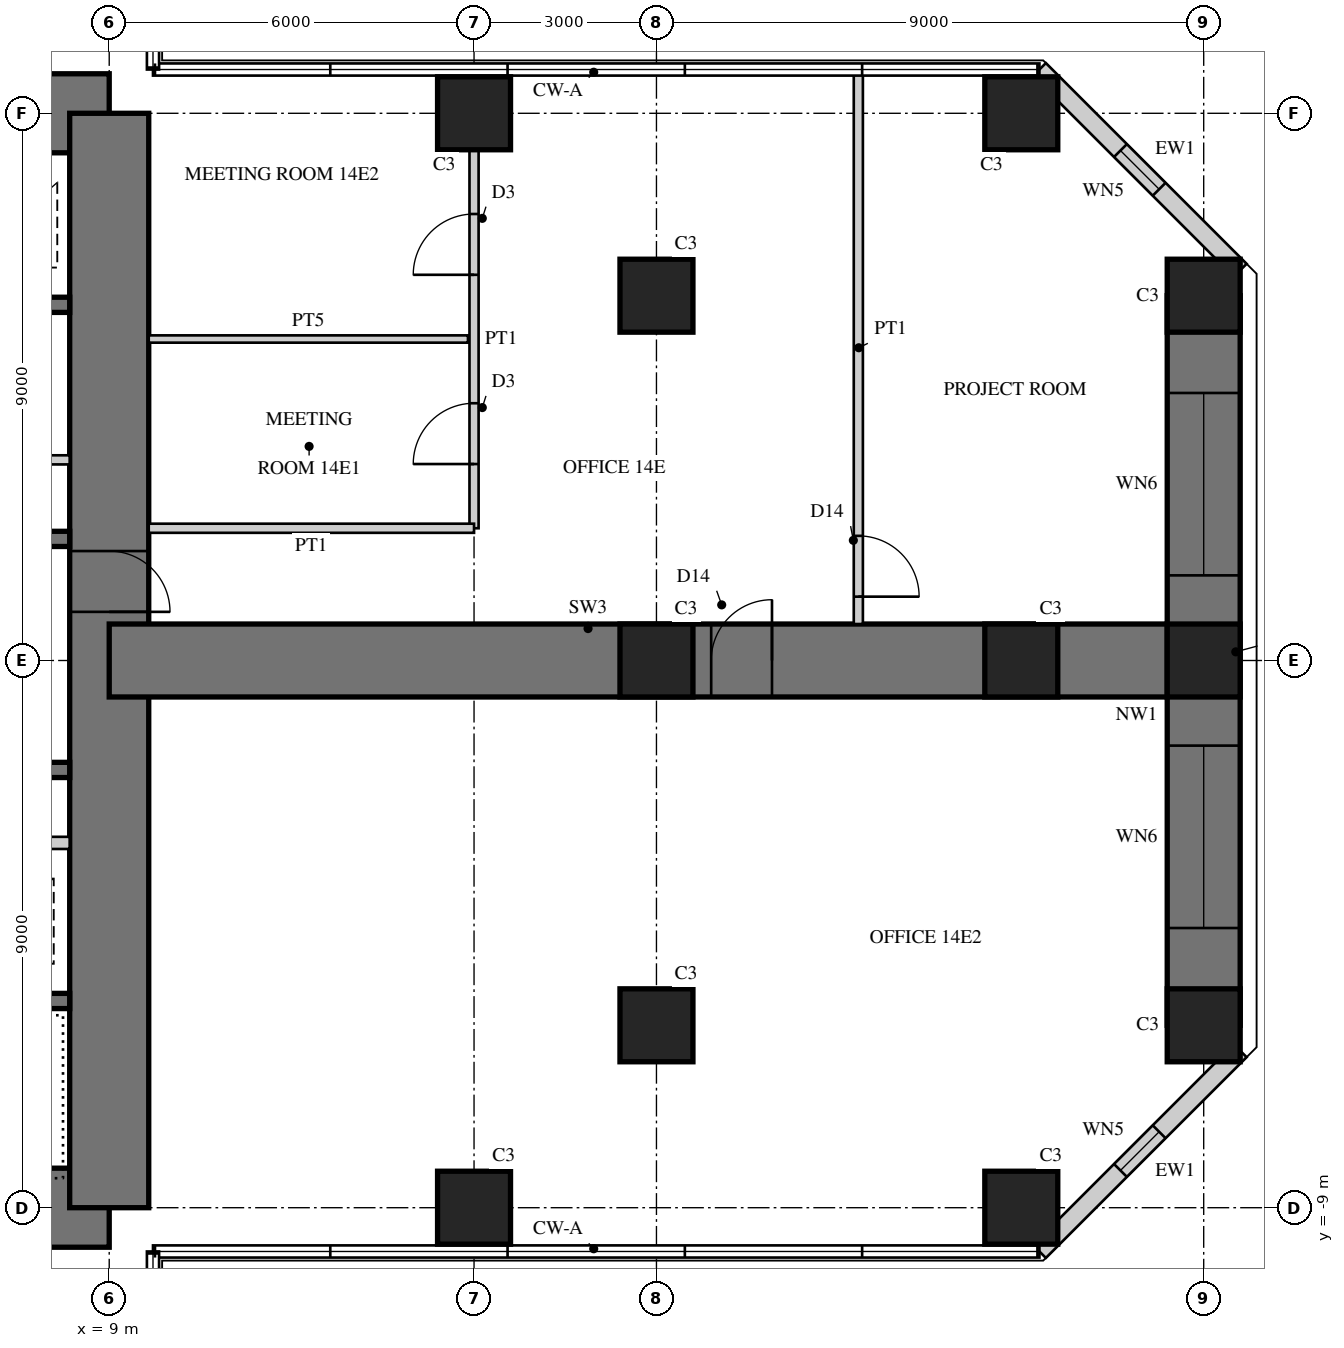
"""IFC4 building model, lengths in metres.
Left out: names, types, materials, properties, quantities, classifications, styles, units other than length and angle.
Written with IfcOpenShell. Run it as: python <this file> out.ifc"""

import sys

from ifc_helpers import new_model, si_unit, direction, frame, frame_2d, origin, origin_2d, place, context, subcontext, project, spatial, rectangle, hollow_rectangle, extrude, element, fill, save


model = new_model("IFC4")
c1 = context("Model", 3, precision=1e-05, world=origin(), true_north=direction((0.0, 1.0)))
c2 = subcontext(c1, "Body", "Model", "MODEL_VIEW")
j1 = project(units=[si_unit("LENGTHUNIT", "METRE"), si_unit("PLANEANGLEUNIT", "RADIAN")], contexts=[c1])
p1 = place(None, origin())
s1 = spatial("IfcSite", under=j1, at=p1, CompositionType="ELEMENT")
p2 = place(p1, origin())
s2 = spatial("IfcBuilding", under=s1, at=p2, CompositionType="ELEMENT")
p3 = place(p2, frame((0.0, 0.0, 59.5)))
s3 = spatial("IfcBuildingStorey", under=s2, at=p3, CompositionType="ELEMENT", Elevation=59.5)
p4 = place(p3, frame((9.0, 9.0, 0.0), z_axis=(0.0, 0.0, 1.0), x_axis=(-1.0, 0.0, 0.0)))
e1 = element("IfcWall", 1, at=p4, inside=s3, PredefinedType="SHEAR", context=c2, shape_type="SweptSolid", body=[
    extrude(rectangle(XDim=18.0, YDim=1.3, at=frame_2d((9.0, 0.0))), origin(), (0.0, 0.0, 1.0), 4.0),
])
p5 = place(p4, frame((9.8, 0.0, 0.0)))
e2 = element("IfcOpeningElement", 2, at=p5, cuts=e1, PredefinedType="OPENING", context=c2, shape_type="SweptSolid", body=[
    extrude(rectangle(XDim=1.0, YDim=2.4, at=frame_2d((0.5, 1.2))), frame((0.0, 0.66, 0.0), z_axis=(0.0, -1.0, 0.0), x_axis=(1.0, 0.0, 0.0)), (0.0, 0.0, 1.0), 1.32),
])
p6 = place(p3, frame((-9.0, -9.0, 0.0), z_axis=(0.0, 0.0, 1.0), x_axis=(1.0, 0.0, 0.0)))
e3 = element("IfcWall", 3, at=p6, inside=s3, PredefinedType="SHEAR", context=c2, shape_type="SweptSolid", body=[
    extrude(rectangle(XDim=18.0, YDim=1.3, at=frame_2d((9.0, 0.0))), origin(), (0.0, 0.0, 1.0), 4.0),
])
p7 = place(p6, frame((9.8, 0.0, 0.0)))
e4 = element("IfcOpeningElement", 4, at=p7, cuts=e3, PredefinedType="OPENING", context=c2, shape_type="SweptSolid", body=[
    extrude(rectangle(XDim=1.0, YDim=2.4, at=frame_2d((0.5, 1.2))), frame((0.0, 0.66, 0.0), z_axis=(0.0, -1.0, 0.0), x_axis=(1.0, 0.0, 0.0)), (0.0, 0.0, 1.0), 1.32),
])
p8 = place(p3, frame((9.0, -9.0, 0.0), z_axis=(0.0, 0.0, 1.0), x_axis=(0.0, 1.0, 0.0)))
e5 = element("IfcWall", 5, at=p8, inside=s3, PredefinedType="SHEAR", context=c2, shape_type="SweptSolid", body=[
    extrude(rectangle(XDim=18.0, YDim=1.3, at=frame_2d((9.0, 0.0))), origin(), (0.0, 0.0, 1.0), 4.0),
])
p9 = place(p8, frame((9.8, 0.0, 0.0)))
e6 = element("IfcOpeningElement", 6, at=p9, cuts=e5, PredefinedType="OPENING", context=c2, shape_type="SweptSolid", body=[
    extrude(rectangle(XDim=1.0, YDim=2.4, at=frame_2d((0.5, 1.2))), frame((0.0, 0.66, 0.0), z_axis=(0.0, -1.0, 0.0), x_axis=(1.0, 0.0, 0.0)), (0.0, 0.0, 1.0), 1.32),
])
p10 = place(p3, frame((1.925, 2.0, 0.0), z_axis=(0.0, 0.0, 1.0), x_axis=(1.0, 0.0, 0.0)))
e7 = element("IfcWall", 7, at=p10, inside=s3, PredefinedType="SHEAR", context=c2, shape_type="SweptSolid", body=[
    extrude(rectangle(XDim=6.425, YDim=0.25, at=frame_2d((3.212, 0.0))), origin(), (0.0, 0.0, 1.0), 4.0),
])
p11 = place(p3, frame((1.925, 5.85, 0.0), z_axis=(0.0, 0.0, 1.0), x_axis=(1.0, 0.0, 0.0)))
e8 = element("IfcWall", 8, at=p11, inside=s3, PredefinedType="SHEAR", context=c2, shape_type="SweptSolid", body=[
    extrude(rectangle(XDim=6.425, YDim=0.25, at=frame_2d((3.212, 0.0))), origin(), (0.0, 0.0, 1.0), 4.0),
])
p12 = place(p11, frame((0.454, 0.0, 0.0)))
e9 = element("IfcOpeningElement", 9, at=p12, cuts=e8, PredefinedType="OPENING", context=c2, shape_type="SweptSolid", body=[
    extrude(rectangle(XDim=1.1, YDim=2.2, at=frame_2d((0.55, 1.1))), frame((0.0, 0.135, 0.0), z_axis=(0.0, -1.0, 0.0), x_axis=(1.0, 0.0, 0.0)), (0.0, 0.0, 1.0), 0.27),
])
p13 = place(p11, frame((2.663, 0.0, 0.0)))
e10 = element("IfcOpeningElement", 10, at=p13, cuts=e8, PredefinedType="OPENING", context=c2, shape_type="SweptSolid", body=[
    extrude(rectangle(XDim=1.1, YDim=2.2, at=frame_2d((0.55, 1.1))), frame((0.0, 0.135, 0.0), z_axis=(0.0, -1.0, 0.0), x_axis=(1.0, 0.0, 0.0)), (0.0, 0.0, 1.0), 0.27),
])
p14 = place(p11, frame((4.871, 0.0, 0.0)))
e11 = element("IfcOpeningElement", 11, at=p14, cuts=e8, PredefinedType="OPENING", context=c2, shape_type="SweptSolid", body=[
    extrude(rectangle(XDim=1.1, YDim=2.2, at=frame_2d((0.55, 1.1))), frame((0.0, 0.135, 0.0), z_axis=(0.0, -1.0, 0.0), x_axis=(1.0, 0.0, 0.0)), (0.0, 0.0, 1.0), 0.27),
])
p15 = place(p3, frame((1.925, 3.3, 0.0), z_axis=(0.0, 0.0, 1.0), x_axis=(1.0, 0.0, 0.0)))
e12 = element("IfcWall", 12, at=p15, inside=s3, PredefinedType="PARTITIONING", context=c2, shape_type="SweptSolid", body=[
    extrude(rectangle(XDim=6.425, YDim=0.15, at=frame_2d((3.212, 0.0))), origin(), (0.0, 0.0, 1.0), 4.0),
])
p16 = place(p15, frame((0.075, 0.0, 0.0)))
e13 = element("IfcOpeningElement", 13, at=p16, cuts=e12, PredefinedType="OPENING", context=c2, shape_type="SweptSolid", body=[
    extrude(rectangle(XDim=0.8, YDim=2.1, at=frame_2d((0.4, 1.05))), frame((0.0, 0.085, 0.0), z_axis=(0.0, -1.0, 0.0), x_axis=(1.0, 0.0, 0.0)), (0.0, 0.0, 1.0), 0.17),
])
p17 = place(p15, frame((3.675, 0.0, 0.0)))
e14 = element("IfcOpeningElement", 14, at=p17, cuts=e12, PredefinedType="OPENING", context=c2, shape_type="SweptSolid", body=[
    extrude(rectangle(XDim=0.8, YDim=2.1, at=frame_2d((0.4, 1.05))), frame((0.0, 0.085, 0.0), z_axis=(0.0, -1.0, 0.0), x_axis=(1.0, 0.0, 0.0)), (0.0, 0.0, 1.0), 0.17),
])
p18 = place(p3, frame((2.125, -1.8, 0.0), z_axis=(0.0, 0.0, 1.0), x_axis=(1.0, 0.0, 0.0)))
e15 = element("IfcWall", 15, at=p18, inside=s3, PredefinedType="SHEAR", context=c2, shape_type="SweptSolid", body=[
    extrude(rectangle(XDim=6.225, YDim=0.25, at=frame_2d((3.113, 0.0))), origin(), (0.0, 0.0, 1.0), 4.0),
])
p19 = place(p3, frame((2.125, -5.6, 0.0), z_axis=(0.0, 0.0, 1.0), x_axis=(1.0, 0.0, 0.0)))
e16 = element("IfcWall", 16, at=p19, inside=s3, PredefinedType="SHEAR", context=c2, shape_type="SweptSolid", body=[
    extrude(rectangle(XDim=6.225, YDim=0.25, at=frame_2d((3.113, 0.0))), origin(), (0.0, 0.0, 1.0), 4.0),
])
p20 = place(p19, frame((0.175, 0.0, 0.0)))
e17 = element("IfcOpeningElement", 17, at=p20, cuts=e16, PredefinedType="OPENING", context=c2, shape_type="SweptSolid", body=[
    extrude(rectangle(XDim=1.0, YDim=2.1, at=frame_2d((0.5, 1.05))), frame((0.0, 0.135, 0.0), z_axis=(0.0, -1.0, 0.0), x_axis=(1.0, 0.0, 0.0)), (0.0, 0.0, 1.0), 0.27),
])
p21 = place(p3, frame((5.725, -3.0, 0.0), z_axis=(0.0, 0.0, 1.0), x_axis=(1.0, 0.0, 0.0)))
e18 = element("IfcWall", 18, at=p21, inside=s3, PredefinedType="PARTITIONING", context=c2, shape_type="SweptSolid", body=[
    extrude(rectangle(XDim=2.625, YDim=0.2, at=frame_2d((1.312, 0.0))), origin(), (0.0, 0.0, 1.0), 4.0),
])
p22 = place(p3, frame((9.0, 0.0, 0.0), z_axis=(0.0, 0.0, 1.0), x_axis=(1.0, 0.0, 0.0)))
e19 = element("IfcWall", 19, at=p22, inside=s3, PredefinedType="SHEAR", context=c2, shape_type="SweptSolid", body=[
    extrude(rectangle(XDim=18.0, YDim=1.2, at=frame_2d((9.0, 0.0))), origin(), (0.0, 0.0, 1.0), 4.0),
])
p23 = place(p22, frame((9.9, 0.0, 0.0)))
e20 = element("IfcOpeningElement", 20, at=p23, cuts=e19, PredefinedType="OPENING", context=c2, shape_type="SweptSolid", body=[
    extrude(rectangle(XDim=1.0, YDim=2.2, at=frame_2d((0.5, 1.1))), frame((0.0, 0.61, 0.0), z_axis=(0.0, -1.0, 0.0), x_axis=(1.0, 0.0, 0.0)), (0.0, 0.0, 1.0), 1.22),
])
p24 = place(p3, frame((27.0, -6.0, 0.0), z_axis=(0.0, 0.0, 1.0), x_axis=(0.0, 1.0, 0.0)))
e21 = element("IfcWall", 21, at=p24, inside=s3, PredefinedType="SHEAR", context=c2, shape_type="SweptSolid", body=[
    extrude(rectangle(XDim=12.0, YDim=1.2, at=frame_2d((6.0, 0.0))), origin(), (0.0, 0.0, 1.0), 4.0),
])
p25 = place(p24, frame((1.6, 0.0, 0.6)))
e22 = element("IfcOpeningElement", 22, at=p25, cuts=e21, PredefinedType="OPENING", context=c2, shape_type="SweptSolid", body=[
    extrude(rectangle(XDim=3.0, YDim=2.4, at=frame_2d((1.5, 1.2))), frame((0.0, 0.61, 0.0), z_axis=(0.0, -1.0, 0.0), x_axis=(1.0, 0.0, 0.0)), (0.0, 0.0, 1.0), 1.22),
])
p26 = place(p24, frame((7.4, 0.0, 0.6)))
e23 = element("IfcOpeningElement", 23, at=p26, cuts=e21, PredefinedType="OPENING", context=c2, shape_type="SweptSolid", body=[
    extrude(rectangle(XDim=3.0, YDim=2.4, at=frame_2d((1.5, 1.2))), frame((0.0, 0.61, 0.0), z_axis=(0.0, -1.0, 0.0), x_axis=(1.0, 0.0, 0.0)), (0.0, 0.0, 1.0), 1.22),
])
for number, where, z_axis, x_axis in (
    (24, (15.0, -9.0, 0.0), (0.0, 0.0, 1.0), (1.0, 0.0, 0.0)),
    (25, (24.0, -9.0, 0.0), (0.0, 0.0, 1.0), (1.0, 0.0, 0.0)),
    (26, (15.0, 9.0, 0.0), (0.0, 0.0, 1.0), (1.0, 0.0, 0.0)),
    (27, (24.0, 9.0, 0.0), (0.0, 0.0, 1.0), (1.0, 0.0, 0.0)),
    (28, (27.0, -6.0, 0.0), (0.0, 0.0, 1.0), (1.0, 0.0, 0.0)),
    (29, (27.0, 0.0, 0.0), (0.0, 0.0, 1.0), (1.0, 0.0, 0.0)),
    (30, (27.0, 6.0, 0.0), (0.0, 0.0, 1.0), (1.0, 0.0, 0.0)),
    (31, (18.0, -6.0, 0.0), (0.0, 0.0, 1.0), (1.0, 0.0, 0.0)),
    (32, (18.0, 0.0, 0.0), (0.0, 0.0, 1.0), (1.0, 0.0, 0.0)),
    (33, (18.0, 6.0, 0.0), (0.0, 0.0, 1.0), (1.0, 0.0, 0.0)),
    (34, (24.0, 0.0, 0.0), (0.0, 0.0, 1.0), (1.0, 0.0, 0.0)),
):
    element("IfcColumn", number, at=place(p3, frame(where, z_axis=z_axis, x_axis=x_axis)), inside=s3, PredefinedType="COLUMN", context=c2, shape_type="SweptSolid", body=[
        extrude(rectangle(XDim=1.2, YDim=1.2, at=origin_2d()), origin(), (0.0, 0.0, 1.0), 4.0),
    ])
p27 = place(p3, frame((24.298, -9.72, 0.0), z_axis=(0.0, 0.0, 1.0), x_axis=(0.707106781187, 0.707106781187, 0.0)))
e35 = element("IfcWall", 35, at=p27, inside=s3, PredefinedType="SOLIDWALL", context=c2, shape_type="SweptSolid", body=[
    extrude(rectangle(XDim=4.669, YDim=0.3, at=frame_2d((2.335, 0.0))), origin(), (0.0, 0.0, 1.0), 3.8),
])
p28 = place(p27, frame((1.885, 0.0, 0.3)))
e36 = element("IfcOpeningElement", 36, at=p28, cuts=e35, PredefinedType="OPENING", context=c2, shape_type="SweptSolid", body=[
    extrude(rectangle(XDim=0.9, YDim=2.4, at=frame_2d((0.45, 1.2))), frame((0.0, 0.16, 0.0), z_axis=(0.0, -1.0, 0.0), x_axis=(1.0, 0.0, 0.0)), (0.0, 0.0, 1.0), 0.32),
])
p29 = place(p3, frame((27.6, 6.418, 0.0), z_axis=(0.0, 0.0, 1.0), x_axis=(-0.707106781187, 0.707106781187, 0.0)))
e37 = element("IfcWall", 37, at=p29, inside=s3, PredefinedType="SOLIDWALL", context=c2, shape_type="SweptSolid", body=[
    extrude(rectangle(XDim=4.669, YDim=0.3, at=frame_2d((2.335, 0.0))), origin(), (0.0, 0.0, 1.0), 3.8),
])
p30 = place(p29, frame((1.885, 0.0, 0.3)))
e38 = element("IfcOpeningElement", 38, at=p30, cuts=e37, PredefinedType="OPENING", context=c2, shape_type="SweptSolid", body=[
    extrude(rectangle(XDim=0.9, YDim=2.4, at=frame_2d((0.45, 1.2))), frame((0.0, 0.16, 0.0), z_axis=(0.0, -1.0, 0.0), x_axis=(1.0, 0.0, 0.0)), (0.0, 0.0, 1.0), 0.32),
])
p31 = place(p3, frame((15.0, 2.175, 0.0), z_axis=(0.0, 0.0, 1.0), x_axis=(0.0, 1.0, 0.0)))
e39 = element("IfcWall", 39, at=p31, inside=s3, PredefinedType="PARTITIONING", context=c2, shape_type="SweptSolid", body=[
    extrude(rectangle(XDim=6.225, YDim=0.15, at=frame_2d((3.112, 0.0))), origin(), (0.0, 0.0, 1.0), 2.95),
])
p32 = place(p31, frame((1.056, 0.0, 0.0)))
e40 = element("IfcOpeningElement", 40, at=p32, cuts=e39, PredefinedType="OPENING", context=c2, shape_type="SweptSolid", body=[
    extrude(rectangle(XDim=1.0, YDim=2.1, at=frame_2d((0.5, 1.05))), frame((0.0, 0.085, 0.0), z_axis=(0.0, -1.0, 0.0), x_axis=(1.0, 0.0, 0.0)), (0.0, 0.0, 1.0), 0.17),
])
p33 = place(p31, frame((4.169, 0.0, 0.0)))
e41 = element("IfcOpeningElement", 41, at=p33, cuts=e39, PredefinedType="OPENING", context=c2, shape_type="SweptSolid", body=[
    extrude(rectangle(XDim=1.0, YDim=2.1, at=frame_2d((0.5, 1.05))), frame((0.0, 0.085, 0.0), z_axis=(0.0, -1.0, 0.0), x_axis=(1.0, 0.0, 0.0)), (0.0, 0.0, 1.0), 0.17),
])
p34 = place(p3, frame((9.65, 2.175, 0.0), z_axis=(0.0, 0.0, 1.0), x_axis=(1.0, 0.0, 0.0)))
e42 = element("IfcWall", 42, at=p34, inside=s3, PredefinedType="PARTITIONING", context=c2, shape_type="SweptSolid", body=[
    extrude(rectangle(XDim=5.35, YDim=0.15, at=frame_2d((2.675, 0.0))), origin(), (0.0, 0.0, 1.0), 3.8),
])
p35 = place(p3, frame((9.65, 5.288, 0.0), z_axis=(0.0, 0.0, 1.0), x_axis=(1.0, 0.0, 0.0)))
e43 = element("IfcWall", 43, at=p35, inside=s3, PredefinedType="PLUMBINGWALL", context=c2, shape_type="SweptSolid", body=[
    extrude(rectangle(XDim=5.25, YDim=0.12, at=frame_2d((2.625, 0.0))), origin(), (0.0, 0.0, 1.0), 3.8),
])
p36 = place(p3, frame((21.32, 0.6, 0.0), z_axis=(0.0, 0.0, 1.0), x_axis=(0.0, 1.0, 0.0)))
e44 = element("IfcWall", 44, at=p36, inside=s3, PredefinedType="PARTITIONING", context=c2, shape_type="SweptSolid", body=[
    extrude(rectangle(XDim=9.08, YDim=0.15, at=frame_2d((4.54, 0.0))), origin(), (0.0, 0.0, 1.0), 3.8),
])
p37 = place(p36, frame((0.45, 0.0, 0.0)))
e45 = element("IfcOpeningElement", 45, at=p37, cuts=e44, PredefinedType="OPENING", context=c2, shape_type="SweptSolid", body=[
    extrude(rectangle(XDim=1.0, YDim=2.2, at=frame_2d((0.5, 1.1))), frame((0.0, 0.085, 0.0), z_axis=(0.0, -1.0, 0.0), x_axis=(1.0, 0.0, 0.0)), (0.0, 0.0, 1.0), 0.17),
])
p38 = place(p28, origin())
e46 = element("IfcWindow", 46, at=p38, inside=s3, PartitioningType="SINGLE_PANEL", PredefinedType="WINDOW", context=c2, shape_type="SweptSolid", body=[
    extrude(hollow_rectangle(XDim=0.9, YDim=2.4, WallThickness=0.06, at=frame_2d((0.45, 1.2))), frame((0.0, 0.03, 0.0), z_axis=(0.0, -1.0, 0.0), x_axis=(1.0, 0.0, 0.0)), (0.0, 0.0, 1.0), 0.06),
    extrude(rectangle(XDim=0.779, YDim=2.279, at=frame_2d((0.45, 1.2))), frame((0.0, 0.03, 0.0), z_axis=(0.0, -1.0, 0.0), x_axis=(1.0, 0.0, 0.0)), (0.0, 0.0, 1.0), 0.06),
])
fill(e36, e46)
p39 = place(p25, origin())
e47 = element("IfcWindow", 47, at=p39, inside=s3, PartitioningType="SINGLE_PANEL", PredefinedType="WINDOW", context=c2, shape_type="SweptSolid", body=[
    extrude(hollow_rectangle(XDim=3.0, YDim=2.4, WallThickness=0.06, at=frame_2d((1.5, 1.2))), frame((0.0, 0.03, 0.0), z_axis=(0.0, -1.0, 0.0), x_axis=(1.0, 0.0, 0.0)), (0.0, 0.0, 1.0), 0.06),
    extrude(rectangle(XDim=2.879, YDim=2.279, at=frame_2d((1.5, 1.2))), frame((0.0, 0.03, 0.0), z_axis=(0.0, -1.0, 0.0), x_axis=(1.0, 0.0, 0.0)), (0.0, 0.0, 1.0), 0.06),
])
fill(e22, e47)
p40 = place(p26, origin())
e48 = element("IfcWindow", 48, at=p40, inside=s3, PartitioningType="SINGLE_PANEL", PredefinedType="WINDOW", context=c2, shape_type="SweptSolid", body=[
    extrude(hollow_rectangle(XDim=3.0, YDim=2.4, WallThickness=0.06, at=frame_2d((1.5, 1.2))), frame((0.0, 0.03, 0.0), z_axis=(0.0, -1.0, 0.0), x_axis=(1.0, 0.0, 0.0)), (0.0, 0.0, 1.0), 0.06),
    extrude(rectangle(XDim=2.879, YDim=2.279, at=frame_2d((1.5, 1.2))), frame((0.0, 0.03, 0.0), z_axis=(0.0, -1.0, 0.0), x_axis=(1.0, 0.0, 0.0)), (0.0, 0.0, 1.0), 0.06),
])
fill(e23, e48)
p41 = place(p30, origin())
e49 = element("IfcWindow", 49, at=p41, inside=s3, PartitioningType="SINGLE_PANEL", PredefinedType="WINDOW", context=c2, shape_type="SweptSolid", body=[
    extrude(hollow_rectangle(XDim=0.9, YDim=2.4, WallThickness=0.06, at=frame_2d((0.45, 1.2))), frame((0.0, 0.03, 0.0), z_axis=(0.0, -1.0, 0.0), x_axis=(1.0, 0.0, 0.0)), (0.0, 0.0, 1.0), 0.06),
    extrude(rectangle(XDim=0.779, YDim=2.279, at=frame_2d((0.45, 1.2))), frame((0.0, 0.03, 0.0), z_axis=(0.0, -1.0, 0.0), x_axis=(1.0, 0.0, 0.0)), (0.0, 0.0, 1.0), 0.06),
])
fill(e38, e49)
p42 = place(p32, origin())
e50 = element("IfcDoor", 50, at=p42, inside=s3, OperationType="SINGLE_SWING_LEFT", PredefinedType="DOOR", context=c2, shape_type="SweptSolid", body=[
    extrude(rectangle(XDim=1.0, YDim=2.1, at=frame_2d((0.5, 1.05))), frame((0.0, 0.025, 0.0), z_axis=(0.0, -1.0, 0.0), x_axis=(1.0, 0.0, 0.0)), (0.0, 0.0, 1.0), 0.05),
])
fill(e40, e50)
p43 = place(p33, origin())
e51 = element("IfcDoor", 51, at=p43, inside=s3, OperationType="SINGLE_SWING_LEFT", PredefinedType="DOOR", context=c2, shape_type="SweptSolid", body=[
    extrude(rectangle(XDim=1.0, YDim=2.1, at=frame_2d((0.5, 1.05))), frame((0.0, 0.025, 0.0), z_axis=(0.0, -1.0, 0.0), x_axis=(1.0, 0.0, 0.0)), (0.0, 0.0, 1.0), 0.05),
])
fill(e41, e51)
p44 = place(p37, frame((1.0, 0.0, 0.0), z_axis=(0.0, 0.0, 1.0), x_axis=(-1.0, 0.0, 0.0)))
e52 = element("IfcDoor", 52, at=p44, inside=s3, OperationType="SINGLE_SWING_RIGHT", PredefinedType="DOOR", context=c2, shape_type="SweptSolid", body=[
    extrude(rectangle(XDim=1.0, YDim=2.2, at=frame_2d((0.5, 1.1))), frame((0.0, 0.025, 0.0), z_axis=(0.0, -1.0, 0.0), x_axis=(1.0, 0.0, 0.0)), (0.0, 0.0, 1.0), 0.05),
])
fill(e45, e52)
p45 = place(p23, origin())
e53 = element("IfcDoor", 53, at=p45, inside=s3, OperationType="SINGLE_SWING_RIGHT", PredefinedType="DOOR", context=c2, shape_type="SweptSolid", body=[
    extrude(rectangle(XDim=1.0, YDim=2.2, at=frame_2d((0.5, 1.1))), frame((0.0, 0.025, 0.0), z_axis=(0.0, -1.0, 0.0), x_axis=(1.0, 0.0, 0.0)), (0.0, 0.0, 1.0), 0.05),
])
fill(e20, e53)
p46 = place(p9, frame((1.0, 0.0, 0.0), z_axis=(0.0, 0.0, 1.0), x_axis=(-1.0, 0.0, 0.0)))
e54 = element("IfcDoor", 54, at=p46, inside=s3, OperationType="SINGLE_SWING_RIGHT", PredefinedType="DOOR", context=c2, shape_type="SweptSolid", body=[
    extrude(rectangle(XDim=1.0, YDim=2.4, at=frame_2d((0.5, 1.2))), frame((0.0, -0.005, 0.0), z_axis=(0.0, -1.0, 0.0), x_axis=(1.0, 0.0, 0.0)), (0.0, 0.0, 1.0), 0.05),
])
fill(e6, e54)
save(model, sys.argv[1])
